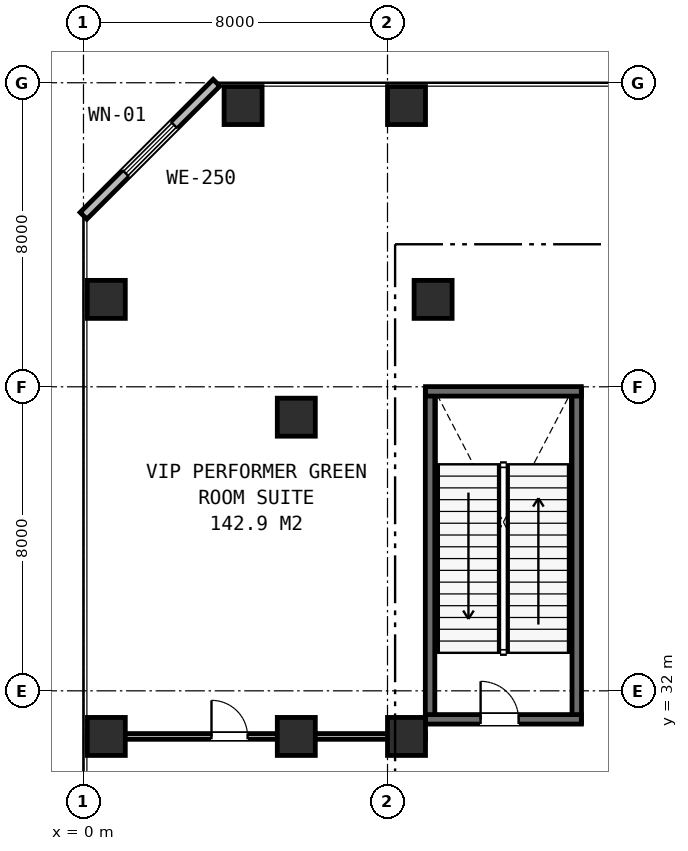
"""IFC4 building model, lengths in metres.
Left out: names, types, materials, properties, quantities, classifications, styles, units other than length and angle.
Written with IfcOpenShell. Run it as: python <this file> out.ifc"""

import sys

from ifc_helpers import new_model, si_unit, direction, frame, frame_2d, origin, origin_2d, place, context, subcontext, project, spatial, rectangle, extrude, element, fill, save


model = new_model("IFC4")
c1 = context("Model", 3, precision=1e-05, world=origin(), true_north=direction((0.0, 1.0)))
c2 = subcontext(c1, "Body", "Model", "MODEL_VIEW")
j1 = project(units=[si_unit("LENGTHUNIT", "METRE"), si_unit("PLANEANGLEUNIT", "RADIAN")], contexts=[c1])
p1 = place(None, origin())
s1 = spatial("IfcSite", under=j1, at=p1, CompositionType="ELEMENT")
p2 = place(p1, origin())
s2 = spatial("IfcBuilding", under=s1, at=p2, CompositionType="ELEMENT")
p3 = place(p2, frame((0.0, 0.0, 15.9)))
s3 = spatial("IfcBuildingStorey", under=s2, at=p3, CompositionType="ELEMENT", Elevation=15.9)
for number, where, z_axis, x_axis in (
    (1, (9.12, 31.15, 0.0), (0.0, 0.0, 1.0), (0.0, 1.0, 0.0)),
    (2, (12.98, 31.15, 0.0), (0.0, 0.0, 1.0), (0.0, 1.0, 0.0)),
):
    element("IfcWall", number, at=place(p3, frame(where, z_axis=z_axis, x_axis=x_axis)), inside=s3, PredefinedType="SHEAR", context=c2, shape_type="SweptSolid", body=[
        extrude(rectangle(XDim=8.8, YDim=0.25, at=frame_2d((4.4, 0.0))), origin(), (0.0, 0.0, 1.0), 5.4),
    ])
p4 = place(p3, frame((9.0, 39.88, 0.0), z_axis=(0.0, 0.0, 1.0), x_axis=(1.0, 0.0, 0.0)))
e3 = element("IfcWall", 3, at=p4, inside=s3, PredefinedType="SHEAR", context=c2, shape_type="SweptSolid", body=[
    extrude(rectangle(XDim=4.1, YDim=0.25, at=frame_2d((2.05, 0.0))), origin(), (0.0, 0.0, 1.0), 5.4),
])
p5 = place(p3, frame((9.0, 31.25, 0.0), z_axis=(0.0, 0.0, 1.0), x_axis=(1.0, 0.0, 0.0)))
e4 = element("IfcWall", 4, at=p5, inside=s3, PredefinedType="SHEAR", context=c2, shape_type="SweptSolid", body=[
    extrude(rectangle(XDim=4.1, YDim=0.25, at=frame_2d((2.05, 0.0))), origin(), (0.0, 0.0, 1.0), 5.4),
])
p6 = place(p5, frame((1.45, 0.0, 0.0)))
e5 = element("IfcOpeningElement", 5, at=p6, cuts=e4, PredefinedType="OPENING", context=c2, shape_type="SweptSolid", body=[
    extrude(rectangle(XDim=1.0, YDim=2.15, at=frame_2d((0.5, 1.075))), frame((0.0, 0.135, 0.0), z_axis=(0.0, -1.0, 0.0), x_axis=(1.0, 0.0, 0.0)), (0.0, 0.0, 1.0), 0.27),
])
for number, where, z_axis, x_axis in (
    (6, (5.6, 30.8, 0.0), (0.0, 0.0, 1.0), (1.0, 0.0, 0.0)),
    (7, (5.6, 39.2, 0.0), (0.0, 0.0, 1.0), (1.0, 0.0, 0.0)),
    (8, (8.5, 30.8, 0.0), (0.0, 0.0, 1.0), (1.0, 0.0, 0.0)),
    (9, (9.2, 42.3, 0.0), (0.0, 0.0, 1.0), (1.0, 0.0, 0.0)),
    (10, (0.6, 30.8, 0.0), (0.0, 0.0, 1.0), (1.0, 0.0, 0.0)),
    (11, (0.6, 42.3, 0.0), (0.0, 0.0, 1.0), (1.0, 0.0, 0.0)),
    (12, (4.2, 47.4, 0.0), (0.0, 0.0, 1.0), (1.0, 0.0, 0.0)),
    (13, (8.5, 47.4, 0.0), (0.0, 0.0, 1.0), (1.0, 0.0, 0.0)),
):
    element("IfcColumn", number, at=place(p3, frame(where, z_axis=z_axis, x_axis=x_axis)), inside=s3, PredefinedType="COLUMN", context=c2, shape_type="SweptSolid", body=[
        extrude(rectangle(XDim=1.0, YDim=1.0, at=origin_2d()), origin(), (0.0, 0.0, 1.0), 5.4),
    ])
p7 = place(p3, frame((3.5, 48.0, 0.0), z_axis=(0.0, 0.0, 1.0), x_axis=(-0.707106781187, -0.707106781187, 0.0)))
e14 = element("IfcWall", 14, at=p7, inside=s3, PredefinedType="STANDARD", context=c2, shape_type="SweptSolid", body=[
    extrude(rectangle(XDim=4.95, YDim=0.25, at=frame_2d((2.475, 0.0))), origin(), (0.0, 0.0, 1.0), 4.94),
])
p8 = place(p7, frame((1.575, 0.0, 0.75)))
e15 = element("IfcOpeningElement", 15, at=p8, cuts=e14, PredefinedType="OPENING", context=c2, shape_type="SweptSolid", body=[
    extrude(rectangle(XDim=1.8, YDim=1.85, at=frame_2d((0.9, 0.925))), frame((0.0, 0.135, 0.0), z_axis=(0.0, -1.0, 0.0), x_axis=(1.0, 0.0, 0.0)), (0.0, 0.0, 1.0), 0.27),
])
p9 = place(p3, frame((0.1, 30.8, 0.0), z_axis=(0.0, 0.0, 1.0), x_axis=(1.0, 0.0, 0.0)))
e16 = element("IfcWall", 16, at=p9, inside=s3, PredefinedType="PARTITIONING", context=c2, shape_type="SweptSolid", body=[
    extrude(rectangle(XDim=8.9, YDim=0.15, at=frame_2d((4.45, 0.0))), origin(), (0.0, 0.0, 1.0), 4.29),
])
p10 = place(p9, frame((3.268, 0.0, 0.0)))
e17 = element("IfcOpeningElement", 17, at=p10, cuts=e16, PredefinedType="OPENING", context=c2, shape_type="SweptSolid", body=[
    extrude(rectangle(XDim=0.95, YDim=2.15, at=frame_2d((0.475, 1.075))), frame((0.0, 0.085, 0.0), z_axis=(0.0, -1.0, 0.0), x_axis=(1.0, 0.0, 0.0)), (0.0, 0.0, 1.0), 0.17),
])
p11 = place(p8, origin())
e18 = element("IfcWindow", 18, at=p11, inside=s3, PartitioningType="SINGLE_PANEL", PredefinedType="WINDOW", context=c2, shape_type="SweptSolid", body=[
    extrude(rectangle(XDim=1.8, YDim=1.85, at=frame_2d((0.9, 0.925))), frame((0.0, 0.03, 0.0), z_axis=(0.0, -1.0, 0.0), x_axis=(1.0, 0.0, 0.0)), (0.0, 0.0, 1.0), 0.06),
])
fill(e15, e18)
p12 = place(p6, origin())
e19 = element("IfcDoor", 19, at=p12, inside=s3, OperationType="SINGLE_SWING_LEFT", PredefinedType="DOOR", context=c2, shape_type="SweptSolid", body=[
    extrude(rectangle(XDim=1.0, YDim=2.15, at=frame_2d((0.5, 1.075))), frame((0.0, 0.025, 0.0), z_axis=(0.0, -1.0, 0.0), x_axis=(1.0, 0.0, 0.0)), (0.0, 0.0, 1.0), 0.05),
])
fill(e5, e19)
p13 = place(p10, origin())
e20 = element("IfcDoor", 20, at=p13, inside=s3, OperationType="SINGLE_SWING_LEFT", PredefinedType="DOOR", context=c2, shape_type="SweptSolid", body=[
    extrude(rectangle(XDim=0.95, YDim=2.15, at=frame_2d((0.475, 1.075))), frame((0.0, 0.025, 0.0), z_axis=(0.0, -1.0, 0.0), x_axis=(1.0, 0.0, 0.0)), (0.0, 0.0, 1.0), 0.05),
])
fill(e17, e20)
save(model, sys.argv[1])
